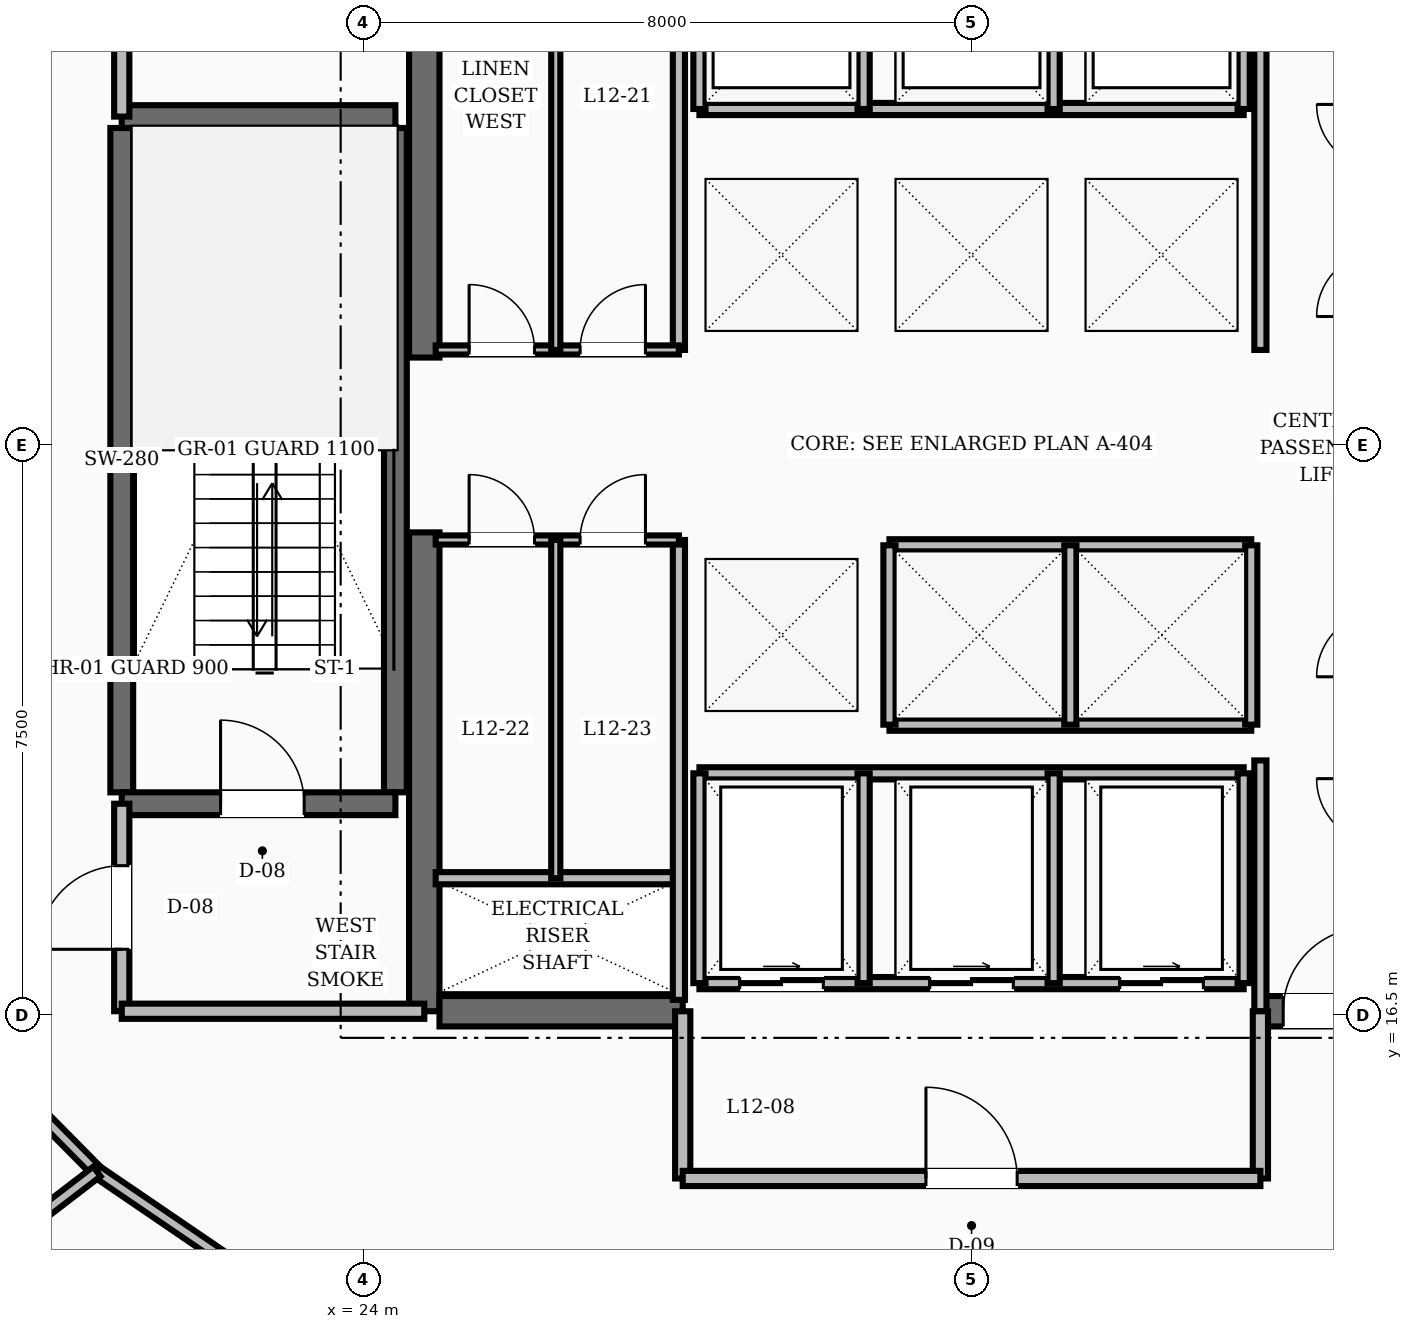
"""IFC4 building model, lengths in metres.
Left out: names, types, materials, properties, quantities, classifications, styles, units other than length and angle.
Written with IfcOpenShell. Run it as: python <this file> out.ifc"""

import sys

from ifc_helpers import new_model, si_unit, direction, frame, frame_2d, origin, place, context, subcontext, project, spatial, rectangle, extrude, element, fill, save


model = new_model("IFC4")
c1 = context("Model", 3, precision=1e-05, world=origin(), true_north=direction((0.0, 1.0)))
c2 = subcontext(c1, "Body", "Model", "MODEL_VIEW")
j1 = project(units=[si_unit("LENGTHUNIT", "METRE"), si_unit("PLANEANGLEUNIT", "RADIAN")], contexts=[c1])
p1 = place(None, origin())
s1 = spatial("IfcSite", under=j1, at=p1, CompositionType="ELEMENT")
p2 = place(p1, origin())
s2 = spatial("IfcBuilding", under=s1, at=p2, CompositionType="ELEMENT")
p3 = place(p2, frame((0.0, 0.0, 52.0)))
s3 = spatial("IfcBuildingStorey", under=s2, at=p3, CompositionType="ELEMENT", Elevation=52.0)
for number, where, z_axis, x_axis in (
    (1, (24.8, 16.55, 0.0), (0.0, 0.0, 1.0), (0.0, 1.0, 0.0)),
    (2, (24.8, 25.15, 0.0), (0.0, 0.0, 1.0), (0.0, 1.0, 0.0)),
):
    element("IfcWall", number, at=place(p3, frame(where, z_axis=z_axis, x_axis=x_axis)), inside=s3, PredefinedType="SHEAR", context=c2, shape_type="SweptSolid", body=[
        extrude(rectangle(XDim=6.3, YDim=0.4, at=frame_2d((3.15, 0.0))), origin(), (0.0, 0.0, 1.0), 3.6),
    ])
p4 = place(p3, frame((25.0, 16.55, 0.0), z_axis=(0.0, 0.0, 1.0), x_axis=(1.0, 0.0, 0.0)))
e3 = element("IfcWall", 3, at=p4, inside=s3, PredefinedType="SHEAR", context=c2, shape_type="SweptSolid", body=[
    extrude(rectangle(XDim=3.2, YDim=0.4, at=frame_2d((1.6, 0.0))), origin(), (0.0, 0.0, 1.0), 3.6),
])
p5 = place(p3, frame((35.8, 16.55, 0.0), z_axis=(0.0, 0.0, 1.0), x_axis=(1.0, 0.0, 0.0)))
e4 = element("IfcWall", 4, at=p5, inside=s3, PredefinedType="SHEAR", context=c2, shape_type="SweptSolid", body=[
    extrude(rectangle(XDim=3.2, YDim=0.4, at=frame_2d((1.6, 0.0))), origin(), (0.0, 0.0, 1.0), 3.6),
])
p6 = place(p5, frame((0.3, 0.0, 0.0)))
e5 = element("IfcOpeningElement", 5, at=p6, cuts=e4, PredefinedType="OPENING", context=c2, shape_type="SweptSolid", body=[
    extrude(rectangle(XDim=1.1, YDim=2.1, at=frame_2d((0.55, 1.05))), frame((0.0, 0.21, 0.0), z_axis=(0.0, -1.0, 0.0), x_axis=(1.0, 0.0, 0.0)), (0.0, 0.0, 1.0), 0.42),
])
for number, where, z_axis, x_axis in (
    (6, (20.82, 19.43, 0.0), (0.0, 0.0, 1.0), (0.0, 1.0, 0.0)),
    (7, (24.42, 19.43, 0.0), (0.0, 0.0, 1.0), (0.0, 1.0, 0.0)),
):
    element("IfcWall", number, at=place(p3, frame(where, z_axis=z_axis, x_axis=x_axis)), inside=s3, PredefinedType="SHEAR", context=c2, shape_type="SweptSolid", body=[
        extrude(rectangle(XDim=8.74, YDim=0.3, at=frame_2d((4.37, 0.0))), origin(), (0.0, 0.0, 1.0), 3.6),
    ])
p7 = place(p3, frame((20.82, 19.28, 0.0), z_axis=(0.0, 0.0, 1.0), x_axis=(1.0, 0.0, 0.0)))
e8 = element("IfcWall", 8, at=p7, inside=s3, PredefinedType="SHEAR", context=c2, shape_type="SweptSolid", body=[
    extrude(rectangle(XDim=3.6, YDim=0.3, at=frame_2d((1.8, 0.0))), origin(), (0.0, 0.0, 1.0), 3.6),
])
p8 = place(p7, frame((1.3, 0.0, 0.0)))
e9 = element("IfcOpeningElement", 9, at=p8, cuts=e8, PredefinedType="OPENING", context=c2, shape_type="SweptSolid", body=[
    extrude(rectangle(XDim=1.1, YDim=2.1, at=frame_2d((0.55, 1.05))), frame((0.0, 0.16, 0.0), z_axis=(0.0, -1.0, 0.0), x_axis=(1.0, 0.0, 0.0)), (0.0, 0.0, 1.0), 0.32),
])
p9 = place(p3, frame((20.82, 28.32, 0.0), z_axis=(0.0, 0.0, 1.0), x_axis=(1.0, 0.0, 0.0)))
e10 = element("IfcWall", 10, at=p9, inside=s3, PredefinedType="SHEAR", context=c2, shape_type="SweptSolid", body=[
    extrude(rectangle(XDim=3.6, YDim=0.3, at=frame_2d((1.8, 0.0))), origin(), (0.0, 0.0, 1.0), 3.6),
])
p10 = place(p3, frame((20.82, 16.55, 0.0), z_axis=(0.0, 0.0, 1.0), x_axis=(0.0, 1.0, 0.0)))
e11 = element("IfcWall", 11, at=p10, inside=s3, PredefinedType="SOLIDWALL", context=c2, shape_type="SweptSolid", body=[
    extrude(rectangle(XDim=2.73, YDim=0.2, at=frame_2d((1.365, 0.0))), origin(), (0.0, 0.0, 1.0), 2.61),
])
p11 = place(p10, frame((0.815, 0.0, 0.0)))
e12 = element("IfcOpeningElement", 12, at=p11, cuts=e11, PredefinedType="OPENING", context=c2, shape_type="SweptSolid", body=[
    extrude(rectangle(XDim=1.1, YDim=2.1, at=frame_2d((0.55, 1.05))), frame((0.0, 0.11, 0.0), z_axis=(0.0, -1.0, 0.0), x_axis=(1.0, 0.0, 0.0)), (0.0, 0.0, 1.0), 0.22),
])
p12 = place(p3, frame((20.82, 16.55, 0.0), z_axis=(0.0, 0.0, 1.0), x_axis=(1.0, 0.0, 0.0)))
e13 = element("IfcWall", 13, at=p12, inside=s3, PredefinedType="SOLIDWALL", context=c2, shape_type="SweptSolid", body=[
    extrude(rectangle(XDim=3.98, YDim=0.2, at=frame_2d((1.99, 0.0))), origin(), (0.0, 0.0, 1.0), 2.61),
])
p13 = place(p3, frame((20.82, 28.32, 0.0), z_axis=(0.0, 0.0, 1.0), x_axis=(0.0, 1.0, 0.0)))
e14 = element("IfcWall", 14, at=p13, inside=s3, PredefinedType="SOLIDWALL", context=c2, shape_type="SweptSolid", body=[
    extrude(rectangle(XDim=3.13, YDim=0.2, at=frame_2d((1.565, 0.0))), origin(), (0.0, 0.0, 1.0), 2.61),
])
p14 = place(p13, frame((1.09, 0.0, 0.0)))
e15 = element("IfcOpeningElement", 15, at=p14, cuts=e14, PredefinedType="OPENING", context=c2, shape_type="SweptSolid", body=[
    extrude(rectangle(XDim=0.95, YDim=2.1, at=frame_2d((0.475, 1.05))), frame((0.0, 0.11, 0.0), z_axis=(0.0, -1.0, 0.0), x_axis=(1.0, 0.0, 0.0)), (0.0, 0.0, 1.0), 0.22),
])
p15 = place(p3, frame((35.8, 16.55, 0.0), z_axis=(0.0, 0.0, 1.0), x_axis=(0.0, 1.0, 0.0)))
e16 = element("IfcWall", 16, at=p15, inside=s3, PredefinedType="SOLIDWALL", context=c2, shape_type="SweptSolid", body=[
    extrude(rectangle(XDim=3.3, YDim=0.16, at=frame_2d((1.65, 0.0))), origin(), (0.0, 0.0, 1.0), 2.61),
])
p16 = place(p3, frame((35.8, 25.25, 0.0), z_axis=(0.0, 0.0, 1.0), x_axis=(0.0, 1.0, 0.0)))
e17 = element("IfcWall", 17, at=p16, inside=s3, PredefinedType="SOLIDWALL", context=c2, shape_type="SweptSolid", body=[
    extrude(rectangle(XDim=6.2, YDim=0.16, at=frame_2d((3.1, 0.0))), origin(), (0.0, 0.0, 1.0), 2.61),
])
for number, where, z_axis, x_axis in (
    (18, (28.2, 14.35, 0.0), (0.0, 0.0, 1.0), (0.0, 1.0, 0.0)),
    (19, (35.8, 14.35, 0.0), (0.0, 0.0, 1.0), (0.0, 1.0, 0.0)),
):
    element("IfcWall", number, at=place(p3, frame(where, z_axis=z_axis, x_axis=x_axis)), inside=s3, PredefinedType="SOLIDWALL", context=c2, shape_type="SweptSolid", body=[
        extrude(rectangle(XDim=2.2, YDim=0.2, at=frame_2d((1.1, 0.0))), origin(), (0.0, 0.0, 1.0), 2.61),
    ])
p17 = place(p3, frame((28.2, 14.35, 0.0), z_axis=(0.0, 0.0, 1.0), x_axis=(1.0, 0.0, 0.0)))
e20 = element("IfcWall", 20, at=p17, inside=s3, PredefinedType="SOLIDWALL", context=c2, shape_type="SweptSolid", body=[
    extrude(rectangle(XDim=7.6, YDim=0.2, at=frame_2d((3.8, 0.0))), origin(), (0.0, 0.0, 1.0), 2.61),
])
p18 = place(p17, frame((3.2, 0.0, 0.0)))
e21 = element("IfcOpeningElement", 21, at=p18, cuts=e20, PredefinedType="OPENING", context=c2, shape_type="SweptSolid", body=[
    extrude(rectangle(XDim=1.2, YDim=2.1, at=frame_2d((0.6, 1.05))), frame((0.0, 0.11, 0.0), z_axis=(0.0, -1.0, 0.0), x_axis=(1.0, 0.0, 0.0)), (0.0, 0.0, 1.0), 0.22),
])
p19 = place(p3, frame((28.42, 28.42, 0.0), z_axis=(0.0, 0.0, 1.0), x_axis=(1.0, 0.0, 0.0)))
e22 = element("IfcWall", 22, at=p19, inside=s3, PredefinedType="SOLIDWALL", context=c2, shape_type="SweptSolid", body=[
    extrude(rectangle(XDim=7.16, YDim=0.16, at=frame_2d((3.58, 0.0))), origin(), (0.0, 0.0, 1.0), 2.61),
])
for number, where, z_axis, x_axis in (
    (23, (28.42, 28.42, 0.0), (0.0, 0.0, 1.0), (0.0, 1.0, 0.0)),
    (24, (30.58, 28.42, 0.0), (0.0, 0.0, 1.0), (0.0, 1.0, 0.0)),
    (25, (33.08, 28.42, 0.0), (0.0, 0.0, 1.0), (0.0, 1.0, 0.0)),
    (26, (35.58, 28.42, 0.0), (0.0, 0.0, 1.0), (0.0, 1.0, 0.0)),
):
    element("IfcWall", number, at=place(p3, frame(where, z_axis=z_axis, x_axis=x_axis)), inside=s3, PredefinedType="SOLIDWALL", context=c2, shape_type="SweptSolid", body=[
        extrude(rectangle(XDim=2.16, YDim=0.16, at=frame_2d((1.08, 0.0))), origin(), (0.0, 0.0, 1.0), 2.61),
    ])
for number, where, z_axis, x_axis in (
    (27, (30.92, 22.68, 0.0), (0.0, 0.0, 1.0), (1.0, 0.0, 0.0)),
    (28, (30.92, 20.32, 0.0), (0.0, 0.0, 1.0), (1.0, 0.0, 0.0)),
):
    element("IfcWall", number, at=place(p3, frame(where, z_axis=z_axis, x_axis=x_axis)), inside=s3, PredefinedType="SOLIDWALL", context=c2, shape_type="SweptSolid", body=[
        extrude(rectangle(XDim=4.76, YDim=0.16, at=frame_2d((2.38, 0.0))), origin(), (0.0, 0.0, 1.0), 2.61),
    ])
for number, where, z_axis, x_axis in (
    (29, (30.92, 20.32, 0.0), (0.0, 0.0, 1.0), (0.0, 1.0, 0.0)),
    (30, (33.3, 20.32, 0.0), (0.0, 0.0, 1.0), (0.0, 1.0, 0.0)),
    (31, (35.68, 20.32, 0.0), (0.0, 0.0, 1.0), (0.0, 1.0, 0.0)),
):
    element("IfcWall", number, at=place(p3, frame(where, z_axis=z_axis, x_axis=x_axis)), inside=s3, PredefinedType="SOLIDWALL", context=c2, shape_type="SweptSolid", body=[
        extrude(rectangle(XDim=2.36, YDim=0.16, at=frame_2d((1.18, 0.0))), origin(), (0.0, 0.0, 1.0), 2.61),
    ])
p20 = place(p3, frame((28.42, 16.92, 0.0), z_axis=(0.0, 0.0, 1.0), x_axis=(1.0, 0.0, 0.0)))
e32 = element("IfcWall", 32, at=p20, inside=s3, PredefinedType="SOLIDWALL", context=c2, shape_type="SweptSolid", body=[
    extrude(rectangle(XDim=7.16, YDim=0.16, at=frame_2d((3.58, 0.0))), origin(), (0.0, 0.0, 1.0), 2.61),
])
p21 = place(p20, frame((0.53, 0.0, 0.0)))
e33 = element("IfcOpeningElement", 33, at=p21, cuts=e32, PredefinedType="OPENING", context=c2, shape_type="SweptSolid", body=[
    extrude(rectangle(XDim=1.1, YDim=2.15, at=frame_2d((0.55, 1.075))), frame((0.0, 0.09, 0.0), z_axis=(0.0, -1.0, 0.0), x_axis=(1.0, 0.0, 0.0)), (0.0, 0.0, 1.0), 0.18),
])
p22 = place(p20, frame((3.03, 0.0, 0.0)))
e34 = element("IfcOpeningElement", 34, at=p22, cuts=e32, PredefinedType="OPENING", context=c2, shape_type="SweptSolid", body=[
    extrude(rectangle(XDim=1.1, YDim=2.15, at=frame_2d((0.55, 1.075))), frame((0.0, 0.09, 0.0), z_axis=(0.0, -1.0, 0.0), x_axis=(1.0, 0.0, 0.0)), (0.0, 0.0, 1.0), 0.18),
])
p23 = place(p20, frame((5.53, 0.0, 0.0)))
e35 = element("IfcOpeningElement", 35, at=p23, cuts=e32, PredefinedType="OPENING", context=c2, shape_type="SweptSolid", body=[
    extrude(rectangle(XDim=1.1, YDim=2.15, at=frame_2d((0.55, 1.075))), frame((0.0, 0.09, 0.0), z_axis=(0.0, -1.0, 0.0), x_axis=(1.0, 0.0, 0.0)), (0.0, 0.0, 1.0), 0.18),
])
p24 = place(p3, frame((28.42, 19.68, 0.0), z_axis=(0.0, 0.0, 1.0), x_axis=(1.0, 0.0, 0.0)))
e36 = element("IfcWall", 36, at=p24, inside=s3, PredefinedType="SOLIDWALL", context=c2, shape_type="SweptSolid", body=[
    extrude(rectangle(XDim=7.16, YDim=0.16, at=frame_2d((3.58, 0.0))), origin(), (0.0, 0.0, 1.0), 2.61),
])
for number, where, z_axis, x_axis in (
    (37, (28.42, 16.92, 0.0), (0.0, 0.0, 1.0), (0.0, 1.0, 0.0)),
    (38, (30.58, 16.92, 0.0), (0.0, 0.0, 1.0), (0.0, 1.0, 0.0)),
    (39, (33.08, 16.92, 0.0), (0.0, 0.0, 1.0), (0.0, 1.0, 0.0)),
    (40, (35.58, 16.92, 0.0), (0.0, 0.0, 1.0), (0.0, 1.0, 0.0)),
):
    element("IfcWall", number, at=place(p3, frame(where, z_axis=z_axis, x_axis=x_axis)), inside=s3, PredefinedType="SOLIDWALL", context=c2, shape_type="SweptSolid", body=[
        extrude(rectangle(XDim=2.76, YDim=0.16, at=frame_2d((1.38, 0.0))), origin(), (0.0, 0.0, 1.0), 2.61),
    ])
p25 = place(p3, frame((24.95, 18.3, 0.0), z_axis=(0.0, 0.0, 1.0), x_axis=(1.0, 0.0, 0.0)))
e41 = element("IfcWall", 41, at=p25, inside=s3, PredefinedType="SOLIDWALL", context=c2, shape_type="SweptSolid", body=[
    extrude(rectangle(XDim=3.2, YDim=0.16, at=frame_2d((1.6, 0.0))), origin(), (0.0, 0.0, 1.0), 2.61),
])
p26 = place(p3, frame((28.15, 16.7, 0.0), z_axis=(0.0, 0.0, 1.0), x_axis=(0.0, 1.0, 0.0)))
e42 = element("IfcWall", 42, at=p26, inside=s3, PredefinedType="SOLIDWALL", context=c2, shape_type="SweptSolid", body=[
    extrude(rectangle(XDim=6.05, YDim=0.16, at=frame_2d((3.025, 0.0))), origin(), (0.0, 0.0, 1.0), 2.61),
])
p27 = place(p3, frame((28.15, 25.25, 0.0), z_axis=(0.0, 0.0, 1.0), x_axis=(0.0, 1.0, 0.0)))
e43 = element("IfcWall", 43, at=p27, inside=s3, PredefinedType="SOLIDWALL", context=c2, shape_type="SweptSolid", body=[
    extrude(rectangle(XDim=6.1, YDim=0.16, at=frame_2d((3.05, 0.0))), origin(), (0.0, 0.0, 1.0), 2.61),
])
p28 = place(p3, frame((24.95, 25.25, 0.0), z_axis=(0.0, 0.0, 1.0), x_axis=(1.0, 0.0, 0.0)))
e44 = element("IfcWall", 44, at=p28, inside=s3, PredefinedType="PARTITIONING", context=c2, shape_type="SweptSolid", body=[
    extrude(rectangle(XDim=3.2, YDim=0.12, at=frame_2d((1.6, 0.0))), origin(), (0.0, 0.0, 1.0), 2.61),
])
p29 = place(p28, frame((0.44, 0.0, 0.0)))
e45 = element("IfcOpeningElement", 45, at=p29, cuts=e44, PredefinedType="OPENING", context=c2, shape_type="SweptSolid", body=[
    extrude(rectangle(XDim=0.86, YDim=2.1, at=frame_2d((0.43, 1.05))), frame((0.0, 0.07, 0.0), z_axis=(0.0, -1.0, 0.0), x_axis=(1.0, 0.0, 0.0)), (0.0, 0.0, 1.0), 0.14),
])
p30 = place(p28, frame((1.9, 0.0, 0.0)))
e46 = element("IfcOpeningElement", 46, at=p30, cuts=e44, PredefinedType="OPENING", context=c2, shape_type="SweptSolid", body=[
    extrude(rectangle(XDim=0.86, YDim=2.1, at=frame_2d((0.43, 1.05))), frame((0.0, 0.07, 0.0), z_axis=(0.0, -1.0, 0.0), x_axis=(1.0, 0.0, 0.0)), (0.0, 0.0, 1.0), 0.14),
])
p31 = place(p3, frame((24.95, 22.75, 0.0), z_axis=(0.0, 0.0, 1.0), x_axis=(1.0, 0.0, 0.0)))
e47 = element("IfcWall", 47, at=p31, inside=s3, PredefinedType="PARTITIONING", context=c2, shape_type="SweptSolid", body=[
    extrude(rectangle(XDim=3.2, YDim=0.12, at=frame_2d((1.6, 0.0))), origin(), (0.0, 0.0, 1.0), 2.61),
])
p32 = place(p31, frame((0.44, 0.0, 0.0)))
e48 = element("IfcOpeningElement", 48, at=p32, cuts=e47, PredefinedType="OPENING", context=c2, shape_type="SweptSolid", body=[
    extrude(rectangle(XDim=0.86, YDim=2.1, at=frame_2d((0.43, 1.05))), frame((0.0, 0.07, 0.0), z_axis=(0.0, -1.0, 0.0), x_axis=(1.0, 0.0, 0.0)), (0.0, 0.0, 1.0), 0.14),
])
p33 = place(p31, frame((1.9, 0.0, 0.0)))
e49 = element("IfcOpeningElement", 49, at=p33, cuts=e47, PredefinedType="OPENING", context=c2, shape_type="SweptSolid", body=[
    extrude(rectangle(XDim=0.86, YDim=2.1, at=frame_2d((0.43, 1.05))), frame((0.0, 0.07, 0.0), z_axis=(0.0, -1.0, 0.0), x_axis=(1.0, 0.0, 0.0)), (0.0, 0.0, 1.0), 0.14),
])
p34 = place(p3, frame((26.53, 25.25, 0.0), z_axis=(0.0, 0.0, 1.0), x_axis=(0.0, 1.0, 0.0)))
e50 = element("IfcWall", 50, at=p34, inside=s3, PredefinedType="PARTITIONING", context=c2, shape_type="SweptSolid", body=[
    extrude(rectangle(XDim=6.1, YDim=0.12, at=frame_2d((3.05, 0.0))), origin(), (0.0, 0.0, 1.0), 2.61),
])
p35 = place(p3, frame((26.53, 18.3, 0.0), z_axis=(0.0, 0.0, 1.0), x_axis=(0.0, 1.0, 0.0)))
e51 = element("IfcWall", 51, at=p35, inside=s3, PredefinedType="PARTITIONING", context=c2, shape_type="SweptSolid", body=[
    extrude(rectangle(XDim=4.45, YDim=0.12, at=frame_2d((2.225, 0.0))), origin(), (0.0, 0.0, 1.0), 2.61),
])
p36 = place(p3, frame((18.469, 16.49, 0.0), z_axis=(0.0, 0.0, 1.0), x_axis=(0.702811997, -0.711375636969, 0.0)))
e52 = element("IfcWall", 52, at=p36, inside=s3, PredefinedType="SOLIDWALL", context=c2, shape_type="SweptSolid", body=[
    extrude(rectangle(XDim=2.879, YDim=0.16, at=frame_2d((1.44, 0.0))), origin(), (0.0, 0.0, 1.0), 2.61),
])
p37 = place(p3, frame((20.492, 14.441, 0.0), z_axis=(0.0, 0.0, 1.0), x_axis=(0.826293096206, -0.56324037423, 0.0)))
e53 = element("IfcWall", 53, at=p37, inside=s3, PredefinedType="SOLIDWALL", context=c2, shape_type="SweptSolid", body=[
    extrude(rectangle(XDim=2.985, YDim=0.16, at=frame_2d((1.492, 0.0))), origin(), (0.0, 0.0, 1.0), 2.61),
])
p38 = place(p3, frame((20.492, 14.441, 0.0), z_axis=(0.0, 0.0, 1.0), x_axis=(-0.793377694402, -0.608729688799, 0.0)))
e54 = element("IfcWall", 54, at=p38, inside=s3, PredefinedType="SOLIDWALL", context=c2, shape_type="SweptSolid", body=[
    extrude(rectangle(XDim=8.543, YDim=0.16, at=frame_2d((4.271, 0.0))), origin(), (0.0, 0.0, 1.0), 2.61),
])
p39 = place(p8, origin())
e55 = element("IfcDoor", 55, at=p39, inside=s3, OperationType="SINGLE_SWING_LEFT", PredefinedType="DOOR", context=c2, shape_type="SweptSolid", body=[
    extrude(rectangle(XDim=1.1, YDim=2.1, at=frame_2d((0.55, 1.05))), frame((0.0, 0.025, 0.0), z_axis=(0.0, -1.0, 0.0), x_axis=(1.0, 0.0, 0.0)), (0.0, 0.0, 1.0), 0.05),
])
fill(e9, e55)
p40 = place(p11, origin())
e56 = element("IfcDoor", 56, at=p40, inside=s3, OperationType="SINGLE_SWING_LEFT", PredefinedType="DOOR", context=c2, shape_type="SweptSolid", body=[
    extrude(rectangle(XDim=1.1, YDim=2.1, at=frame_2d((0.55, 1.05))), frame((0.0, 0.025, 0.0), z_axis=(0.0, -1.0, 0.0), x_axis=(1.0, 0.0, 0.0)), (0.0, 0.0, 1.0), 0.05),
])
fill(e12, e56)
p41 = place(p6, origin())
e57 = element("IfcDoor", 57, at=p41, inside=s3, OperationType="SINGLE_SWING_RIGHT", PredefinedType="DOOR", context=c2, shape_type="SweptSolid", body=[
    extrude(rectangle(XDim=1.1, YDim=2.1, at=frame_2d((0.55, 1.05))), frame((0.0, 0.025, 0.0), z_axis=(0.0, -1.0, 0.0), x_axis=(1.0, 0.0, 0.0)), (0.0, 0.0, 1.0), 0.05),
])
fill(e5, e57)
p42 = place(p18, origin())
e58 = element("IfcDoor", 58, at=p42, inside=s3, OperationType="SINGLE_SWING_LEFT", PredefinedType="DOOR", context=c2, shape_type="SweptSolid", body=[
    extrude(rectangle(XDim=1.2, YDim=2.1, at=frame_2d((0.6, 1.05))), frame((0.0, 0.025, 0.0), z_axis=(0.0, -1.0, 0.0), x_axis=(1.0, 0.0, 0.0)), (0.0, 0.0, 1.0), 0.05),
])
fill(e21, e58)
p43 = place(p21, origin())
e59 = element("IfcDoor", 59, at=p43, inside=s3, OperationType="SLIDING_TO_RIGHT", PredefinedType="DOOR", context=c2, shape_type="SweptSolid", body=[
    extrude(rectangle(XDim=1.1, YDim=2.15, at=frame_2d((0.55, 1.075))), frame((0.0, 0.025, 0.0), z_axis=(0.0, -1.0, 0.0), x_axis=(1.0, 0.0, 0.0)), (0.0, 0.0, 1.0), 0.05),
])
fill(e33, e59)
p44 = place(p22, origin())
e60 = element("IfcDoor", 60, at=p44, inside=s3, OperationType="SLIDING_TO_RIGHT", PredefinedType="DOOR", context=c2, shape_type="SweptSolid", body=[
    extrude(rectangle(XDim=1.1, YDim=2.15, at=frame_2d((0.55, 1.075))), frame((0.0, 0.025, 0.0), z_axis=(0.0, -1.0, 0.0), x_axis=(1.0, 0.0, 0.0)), (0.0, 0.0, 1.0), 0.05),
])
fill(e34, e60)
p45 = place(p23, origin())
e61 = element("IfcDoor", 61, at=p45, inside=s3, OperationType="SLIDING_TO_RIGHT", PredefinedType="DOOR", context=c2, shape_type="SweptSolid", body=[
    extrude(rectangle(XDim=1.1, YDim=2.15, at=frame_2d((0.55, 1.075))), frame((0.0, 0.025, 0.0), z_axis=(0.0, -1.0, 0.0), x_axis=(1.0, 0.0, 0.0)), (0.0, 0.0, 1.0), 0.05),
])
fill(e35, e61)
p46 = place(p29, origin())
e62 = element("IfcDoor", 62, at=p46, inside=s3, OperationType="SINGLE_SWING_LEFT", PredefinedType="DOOR", context=c2, shape_type="SweptSolid", body=[
    extrude(rectangle(XDim=0.86, YDim=2.1, at=frame_2d((0.43, 1.05))), frame((0.0, 0.025, 0.0), z_axis=(0.0, -1.0, 0.0), x_axis=(1.0, 0.0, 0.0)), (0.0, 0.0, 1.0), 0.05),
])
fill(e45, e62)
p47 = place(p30, origin())
e63 = element("IfcDoor", 63, at=p47, inside=s3, OperationType="SINGLE_SWING_RIGHT", PredefinedType="DOOR", context=c2, shape_type="SweptSolid", body=[
    extrude(rectangle(XDim=0.86, YDim=2.1, at=frame_2d((0.43, 1.05))), frame((0.0, 0.025, 0.0), z_axis=(0.0, -1.0, 0.0), x_axis=(1.0, 0.0, 0.0)), (0.0, 0.0, 1.0), 0.05),
])
fill(e46, e63)
p48 = place(p32, origin())
e64 = element("IfcDoor", 64, at=p48, inside=s3, OperationType="SINGLE_SWING_LEFT", PredefinedType="DOOR", context=c2, shape_type="SweptSolid", body=[
    extrude(rectangle(XDim=0.86, YDim=2.1, at=frame_2d((0.43, 1.05))), frame((0.0, 0.025, 0.0), z_axis=(0.0, -1.0, 0.0), x_axis=(1.0, 0.0, 0.0)), (0.0, 0.0, 1.0), 0.05),
])
fill(e48, e64)
p49 = place(p33, origin())
e65 = element("IfcDoor", 65, at=p49, inside=s3, OperationType="SINGLE_SWING_RIGHT", PredefinedType="DOOR", context=c2, shape_type="SweptSolid", body=[
    extrude(rectangle(XDim=0.86, YDim=2.1, at=frame_2d((0.43, 1.05))), frame((0.0, 0.025, 0.0), z_axis=(0.0, -1.0, 0.0), x_axis=(1.0, 0.0, 0.0)), (0.0, 0.0, 1.0), 0.05),
])
fill(e49, e65)
save(model, sys.argv[1])
